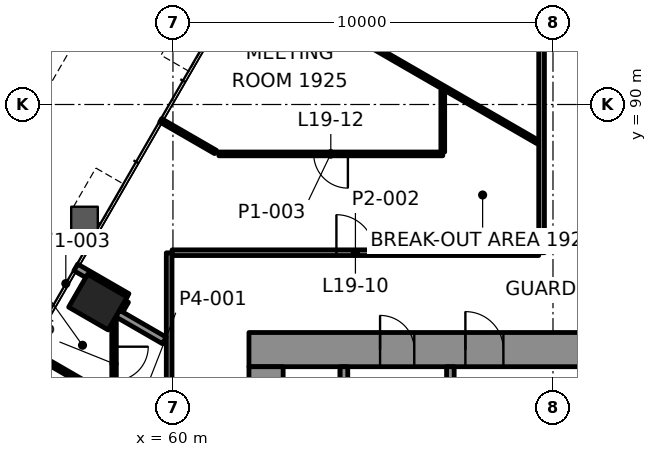
"""IFC4 building model, lengths in metres.
Left out: names, types, materials, properties, quantities, classifications, styles, units other than length and angle.
Written with IfcOpenShell. Run it as: python <this file> out.ifc"""

import sys

from ifc_helpers import new_model, si_unit, direction, frame, frame_2d, origin, origin_2d, place, context, subcontext, project, spatial, rectangle, extrude, element, fill, save


model = new_model("IFC4")
c1 = context("Model", 3, precision=1e-05, world=origin(), true_north=direction((0.0, 1.0)))
c2 = subcontext(c1, "Body", "Model", "MODEL_VIEW")
j1 = project(units=[si_unit("LENGTHUNIT", "METRE"), si_unit("PLANEANGLEUNIT", "RADIAN")], contexts=[c1])
p1 = place(None, origin())
s1 = spatial("IfcSite", under=j1, at=p1, CompositionType="ELEMENT")
p2 = place(p1, origin())
s2 = spatial("IfcBuilding", under=s1, at=p2, CompositionType="ELEMENT")
p3 = place(p2, frame((0.0, 0.0, 86.2)))
s3 = spatial("IfcBuildingStorey", under=s2, at=p3, CompositionType="ELEMENT", Elevation=86.2)
p4 = place(p3, frame((58.025, 84.8, -0.0), z_axis=(0.0, 0.0, 1.0), x_axis=(-0.5, -0.866025403784, 0.0)))
e1 = element("IfcColumn", 1, at=p4, inside=s3, PredefinedType="COLUMN", context=c2, shape_type="SweptSolid", body=[
    extrude(rectangle(XDim=1.0, YDim=1.2, at=origin_2d()), origin(), (0.0, 0.0, 1.0), 4.2),
])
p5 = place(p3, frame((62.0, 83.55, 0.0), z_axis=(0.0, 0.0, 1.0), x_axis=(1.0, 0.0, 0.0)))
e2 = element("IfcWall", 2, at=p5, inside=s3, PredefinedType="SHEAR", context=c2, shape_type="SweptSolid", body=[
    extrude(rectangle(XDim=25.1, YDim=0.9, at=frame_2d((12.55, 0.0))), origin(), (0.0, 0.0, 1.0), 4.0),
])
p6 = place(p5, frame((5.695, 0.0, 0.0)))
e3 = element("IfcOpeningElement", 3, at=p6, cuts=e2, PredefinedType="OPENING", context=c2, shape_type="SweptSolid", body=[
    extrude(rectangle(XDim=1.0, YDim=2.1, at=frame_2d((0.5, 1.05))), frame((0.0, 0.46, 0.0), z_axis=(0.0, -1.0, 0.0), x_axis=(1.0, 0.0, 0.0)), (0.0, 0.0, 1.0), 0.92),
])
p7 = place(p5, frame((19.505, 0.0, 0.0)))
e4 = element("IfcOpeningElement", 4, at=p7, cuts=e2, PredefinedType="OPENING", context=c2, shape_type="SweptSolid", body=[
    extrude(rectangle(XDim=1.0, YDim=2.1, at=frame_2d((0.5, 1.05))), frame((0.0, 0.46, 0.0), z_axis=(0.0, -1.0, 0.0), x_axis=(1.0, 0.0, 0.0)), (0.0, 0.0, 1.0), 0.92),
])
p8 = place(p5, frame((3.45, 0.0, 0.0)))
e5 = element("IfcOpeningElement", 5, at=p8, cuts=e2, PredefinedType="OPENING", context=c2, shape_type="SweptSolid", body=[
    extrude(rectangle(XDim=0.9, YDim=2.1, at=frame_2d((0.45, 1.05))), frame((0.0, 0.46, 0.0), z_axis=(0.0, -1.0, 0.0), x_axis=(1.0, 0.0, 0.0)), (0.0, 0.0, 1.0), 0.92),
])
p9 = place(p5, frame((12.65, 0.0, 0.0)))
e6 = element("IfcOpeningElement", 6, at=p9, cuts=e2, PredefinedType="OPENING", context=c2, shape_type="SweptSolid", body=[
    extrude(rectangle(XDim=0.9, YDim=2.1, at=frame_2d((0.45, 1.05))), frame((0.0, 0.46, 0.0), z_axis=(0.0, -1.0, 0.0), x_axis=(1.0, 0.0, 0.0)), (0.0, 0.0, 1.0), 0.92),
])
p10 = place(p5, frame((22.55, 0.0, 0.0)))
e7 = element("IfcOpeningElement", 7, at=p10, cuts=e2, PredefinedType="OPENING", context=c2, shape_type="SweptSolid", body=[
    extrude(rectangle(XDim=0.9, YDim=2.1, at=frame_2d((0.45, 1.05))), frame((0.0, 0.46, 0.0), z_axis=(0.0, -1.0, 0.0), x_axis=(1.0, 0.0, 0.0)), (0.0, 0.0, 1.0), 0.92),
])
p11 = place(p3, frame((62.45, 66.9, 0.0), z_axis=(0.0, 0.0, 1.0), x_axis=(0.0, 1.0, 0.0)))
e8 = element("IfcWall", 8, at=p11, inside=s3, PredefinedType="SHEAR", context=c2, shape_type="SweptSolid", body=[
    extrude(rectangle(XDim=16.2, YDim=0.9, at=frame_2d((8.1, 0.0))), origin(), (0.0, 0.0, 1.0), 4.0),
])
p12 = place(p11, frame((5.5, 0.0, 0.0)))
e9 = element("IfcOpeningElement", 9, at=p12, cuts=e8, PredefinedType="OPENING", context=c2, shape_type="SweptSolid", body=[
    extrude(rectangle(XDim=1.8, YDim=2.1, at=frame_2d((0.9, 1.05))), frame((0.0, 0.46, 0.0), z_axis=(0.0, -1.0, 0.0), x_axis=(1.0, 0.0, 0.0)), (0.0, 0.0, 1.0), 0.92),
])
p13 = place(p3, frame((59.978, 86.1, 0.0), z_axis=(0.0, 0.0, 1.0), x_axis=(1.0, 0.0, 0.0)))
e10 = element("IfcWall", 10, at=p13, inside=s3, PredefinedType="PARTITIONING", context=c2, shape_type="SweptSolid", body=[
    extrude(rectangle(XDim=9.647, YDim=0.15, at=frame_2d((4.823, 0.0))), origin(), (0.0, 0.0, 1.0), 3.4),
])
p14 = place(p13, frame((4.323, 0.0, 0.0)))
e11 = element("IfcOpeningElement", 11, at=p14, cuts=e10, PredefinedType="OPENING", context=c2, shape_type="SweptSolid", body=[
    extrude(rectangle(XDim=1.0, YDim=2.1, at=frame_2d((0.5, 1.05))), frame((0.0, 0.085, 0.0), z_axis=(0.0, -1.0, 0.0), x_axis=(1.0, 0.0, 0.0)), (0.0, 0.0, 1.0), 0.17),
])
p15 = place(p3, frame((67.1, 88.7, 0.0), z_axis=(0.0, 0.0, 1.0), x_axis=(-1.0, 0.0, 0.0)))
e12 = element("IfcWall", 12, at=p15, inside=s3, PredefinedType="PARTITIONING", context=c2, shape_type="SweptSolid", body=[
    extrude(rectangle(XDim=5.893, YDim=0.1, at=frame_2d((2.947, 0.0))), origin(), (0.0, 0.0, 1.0), 3.4),
])
p16 = place(p15, frame((2.497, 0.0, 0.0)))
e13 = element("IfcOpeningElement", 13, at=p16, cuts=e12, PredefinedType="OPENING", context=c2, shape_type="SweptSolid", body=[
    extrude(rectangle(XDim=0.9, YDim=2.1, at=frame_2d((0.45, 1.05))), frame((0.0, 0.06, 0.0), z_axis=(0.0, -1.0, 0.0), x_axis=(1.0, 0.0, 0.0)), (0.0, 0.0, 1.0), 0.12),
])
p17 = place(p3, frame((58.595, 84.587, 0.0), z_axis=(0.0, 0.0, 1.0), x_axis=(0.499769970942, 0.866158170397, 0.0)))
e14 = element("IfcWall", 14, at=p17, inside=s3, PredefinedType="PARTITIONING", context=c2, shape_type="SweptSolid", body=[
    extrude(rectangle(XDim=0.297, YDim=0.2, at=frame_2d((0.148, 0.0))), origin(), (0.0, 0.0, 1.0), 3.4),
])
p18 = place(p3, frame((69.7, 86.1, 0.0), z_axis=(0.0, 0.0, 1.0), x_axis=(0.0, 1.0, 0.0)))
e15 = element("IfcWall", 15, at=p18, inside=s3, PredefinedType="PARTITIONING", context=c2, shape_type="SweptSolid", body=[
    extrude(rectangle(XDim=10.599, YDim=0.15, at=frame_2d((5.3, 0.0))), origin(), (0.0, 0.0, 1.0), 3.322),
])
p19 = place(p3, frame((67.1, 88.75, 0.0), z_axis=(0.0, 0.0, 1.0), x_axis=(0.0, 1.0, 0.0)))
e16 = element("IfcWall", 16, at=p19, inside=s3, PredefinedType="PARTITIONING", context=c2, shape_type="SweptSolid", body=[
    extrude(rectangle(XDim=1.619, YDim=0.1, at=frame_2d((0.81, 0.0))), origin(), (0.0, 0.0, 1.0), 3.322),
])
p20 = place(p3, frame((59.9, 67.321, 0.0), z_axis=(0.0, 0.0, 1.0), x_axis=(0.0, 1.0, 0.0)))
e17 = element("IfcWall", 17, at=p20, inside=s3, PredefinedType="PARTITIONING", context=c2, shape_type="SweptSolid", body=[
    extrude(rectangle(XDim=18.776, YDim=0.15, at=frame_2d((9.388, 0.0))), origin(), (0.0, 0.0, 1.0), 3.4),
])
p21 = place(p20, frame((11.711, 0.0, 0.0)))
e18 = element("IfcOpeningElement", 18, at=p21, cuts=e17, PredefinedType="OPENING", context=c2, shape_type="SweptSolid", body=[
    extrude(rectangle(XDim=1.2, YDim=2.1, at=frame_2d((0.6, 1.05))), frame((0.0, 0.085, 0.0), z_axis=(0.0, -1.0, 0.0), x_axis=(1.0, 0.0, 0.0)), (0.0, 0.0, 1.0), 0.17),
])
p22 = place(p3, frame((58.45, 84.336, 0.0), z_axis=(0.0, 0.0, 1.0), x_axis=(0.0, -1.0, 0.0)))
e19 = element("IfcWall", 19, at=p22, inside=s3, PredefinedType="PARTITIONING", context=c2, shape_type="SweptSolid", body=[
    extrude(rectangle(XDim=7.953, YDim=0.12, at=frame_2d((3.976, 0.0))), origin(), (0.0, 0.0, 1.0), 3.4),
])
p23 = place(p22, frame((0.709, 0.0, 0.0)))
e20 = element("IfcOpeningElement", 20, at=p23, cuts=e19, PredefinedType="OPENING", context=c2, shape_type="SweptSolid", body=[
    extrude(rectangle(XDim=0.9, YDim=2.1, at=frame_2d((0.45, 1.05))), frame((0.0, 0.07, 0.0), z_axis=(0.0, -1.0, 0.0), x_axis=(1.0, 0.0, 0.0)), (0.0, 0.0, 1.0), 0.14),
])
p24 = place(p22, frame((2.833, 0.0, 0.0)))
e21 = element("IfcOpeningElement", 21, at=p24, cuts=e19, PredefinedType="OPENING", context=c2, shape_type="SweptSolid", body=[
    extrude(rectangle(XDim=0.9, YDim=2.1, at=frame_2d((0.45, 1.05))), frame((0.0, 0.07, 0.0), z_axis=(0.0, -1.0, 0.0), x_axis=(1.0, 0.0, 0.0)), (0.0, 0.0, 1.0), 0.14),
])
p25 = place(p22, frame((5.6, 0.0, 0.0)))
e22 = element("IfcOpeningElement", 22, at=p25, cuts=e19, PredefinedType="OPENING", context=c2, shape_type="SweptSolid", body=[
    extrude(rectangle(XDim=1.0, YDim=2.1, at=frame_2d((0.5, 1.05))), frame((0.0, 0.07, 0.0), z_axis=(0.0, -1.0, 0.0), x_axis=(1.0, 0.0, 0.0)), (0.0, 0.0, 1.0), 0.14),
])
p26 = place(p3, frame((69.599, 89.014, 0.0), z_axis=(0.0, 0.0, 1.0), x_axis=(-0.866016649877, 0.500015161905, 0.0)))
e23 = element("IfcWall", 23, at=p26, inside=s3, PredefinedType="PARTITIONING", context=c2, shape_type="SweptSolid", body=[
    extrude(rectangle(XDim=7.316, YDim=0.1, at=frame_2d((3.658, 0.0))), origin(), (0.0, 0.0, 1.0), 3.322),
])
p27 = place(p3, frame((61.12, 88.75, 0.0), z_axis=(0.0, 0.0, 1.0), x_axis=(-0.865961000814, 0.50011153263, 0.0)))
e24 = element("IfcWall", 24, at=p27, inside=s3, PredefinedType="PARTITIONING", context=c2, shape_type="SweptSolid", body=[
    extrude(rectangle(XDim=1.666, YDim=0.1, at=frame_2d((0.833, 0.0))), origin(), (0.0, 0.0, 1.0), 3.165),
])
p28 = place(p3, frame((58.792, 84.935, 0.0), z_axis=(0.0, 0.0, 1.0), x_axis=(-0.866073306909, 0.499917020175, 0.0)))
e25 = element("IfcWall", 25, at=p28, inside=s3, PredefinedType="PARTITIONING", context=c2, shape_type="SweptSolid", body=[
    extrude(rectangle(XDim=1.557, YDim=0.2, at=frame_2d((0.778, 0.0))), origin(), (0.0, 0.0, 1.0), 3.165),
])
p29 = place(p3, frame((59.773, 83.791, 0.0), z_axis=(0.0, 0.0, 1.0), x_axis=(-0.865999255827, 0.500045286857, 0.0)))
e26 = element("IfcWall", 26, at=p29, inside=s3, PredefinedType="PARTITIONING", context=c2, shape_type="SweptSolid", body=[
    extrude(rectangle(XDim=1.418, YDim=0.2, at=frame_2d((0.709, 0.0))), origin(), (0.0, 0.0, 1.0), 3.4),
])
p30 = place(p3, frame((58.355, 82.275, 0.0), z_axis=(0.0, 0.0, 1.0), x_axis=(-0.866069607179, 0.499923429657, 0.0)))
e27 = element("IfcWall", 27, at=p30, inside=s3, PredefinedType="PARTITIONING", context=c2, shape_type="SweptSolid", body=[
    extrude(rectangle(XDim=2.033, YDim=0.12, at=frame_2d((1.017, 0.0))), origin(), (0.0, 0.0, 1.0), 3.165),
])
p31 = place(p3, frame((69.117, 112.712, 0.0), z_axis=(0.0, 0.0, 1.0), x_axis=(-0.499998392273, -0.866026332004, 0.0)))
e28 = element("IfcWall", 28, at=p31, inside=s3, PredefinedType="SOLIDWALL", context=c2, shape_type="SweptSolid", body=[
    extrude(rectangle(XDim=34.311, YDim=0.8, at=frame_2d((17.156, 0.0))), origin(), (0.0, 0.0, 1.0), 0.9),
])
p32 = place(p3, frame((64.5, 77.9, 0.0), z_axis=(0.0, 0.0, 1.0), x_axis=(0.0, 1.0, 0.0)))
e29 = element("IfcWall", 29, at=p32, inside=s3, PredefinedType="PARTITIONING", context=c2, shape_type="SweptSolid", body=[
    extrude(rectangle(XDim=5.2, YDim=0.2, at=frame_2d((2.6, 0.0))), origin(), (0.0, 0.0, 1.0), 4.0),
])
p33 = place(p3, frame((67.3, 81.28, 0.0), z_axis=(0.0, 0.0, 1.0), x_axis=(0.0, 1.0, 0.0)))
e30 = element("IfcWall", 30, at=p33, inside=s3, PredefinedType="PARTITIONING", context=c2, shape_type="SweptSolid", body=[
    extrude(rectangle(XDim=1.82, YDim=0.2, at=frame_2d((0.91, 0.0))), origin(), (0.0, 0.0, 1.0), 4.0),
])
p34 = place(p14, origin())
e31 = element("IfcDoor", 31, at=p34, inside=s3, OperationType="SINGLE_SWING_LEFT", PredefinedType="DOOR", context=c2, shape_type="SweptSolid", body=[
    extrude(rectangle(XDim=1.0, YDim=2.1, at=frame_2d((0.5, 1.05))), frame((0.0, 0.025, 0.0), z_axis=(0.0, -1.0, 0.0), x_axis=(1.0, 0.0, 0.0)), (0.0, 0.0, 1.0), 0.05),
])
fill(e11, e31)
p35 = place(p16, origin())
e32 = element("IfcDoor", 32, at=p35, inside=s3, OperationType="SINGLE_SWING_LEFT", PredefinedType="DOOR", context=c2, shape_type="SweptSolid", body=[
    extrude(rectangle(XDim=0.9, YDim=2.1, at=frame_2d((0.45, 1.05))), frame((0.0, 0.025, 0.0), z_axis=(0.0, -1.0, 0.0), x_axis=(1.0, 0.0, 0.0)), (0.0, 0.0, 1.0), 0.05),
])
fill(e13, e32)
p36 = place(p23, origin())
e33 = element("IfcDoor", 33, at=p36, inside=s3, OperationType="SINGLE_SWING_LEFT", PredefinedType="DOOR", context=c2, shape_type="SweptSolid", body=[
    extrude(rectangle(XDim=0.9, YDim=2.1, at=frame_2d((0.45, 1.05))), frame((0.0, 0.025, 0.0), z_axis=(0.0, -1.0, 0.0), x_axis=(1.0, 0.0, 0.0)), (0.0, 0.0, 1.0), 0.05),
])
fill(e20, e33)
p37 = place(p6, origin())
e34 = element("IfcDoor", 34, at=p37, inside=s3, OperationType="SINGLE_SWING_LEFT", PredefinedType="DOOR", context=c2, shape_type="SweptSolid", body=[
    extrude(rectangle(XDim=1.0, YDim=2.1, at=frame_2d((0.5, 1.05))), frame((0.0, 0.17, 0.0), z_axis=(0.0, -1.0, 0.0), x_axis=(1.0, 0.0, 0.0)), (0.0, 0.0, 1.0), 0.34),
])
fill(e3, e34)
p38 = place(p8, origin())
e35 = element("IfcDoor", 35, at=p38, inside=s3, OperationType="SINGLE_SWING_RIGHT", PredefinedType="DOOR", context=c2, shape_type="SweptSolid", body=[
    extrude(rectangle(XDim=0.9, YDim=2.1, at=frame_2d((0.45, 1.05))), frame((0.0, 0.17, 0.0), z_axis=(0.0, -1.0, 0.0), x_axis=(1.0, 0.0, 0.0)), (0.0, 0.0, 1.0), 0.34),
])
fill(e5, e35)
save(model, sys.argv[1])
